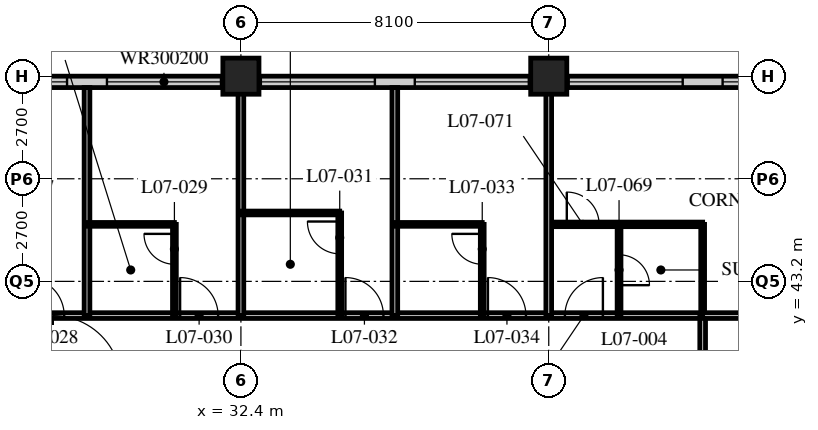
"""IFC4 building model, lengths in metres.
Left out: names, types, materials, properties, quantities, classifications, styles, units other than length and angle.
Written with IfcOpenShell. Run it as: python <this file> out.ifc"""

import sys

from ifc_helpers import new_model, si_unit, direction, frame, frame_2d, origin, origin_2d, place, context, subcontext, project, spatial, rectangle, hollow_rectangle, extrude, element, fill, save


model = new_model("IFC4")
c1 = context("Model", 3, precision=1e-05, world=origin(), true_north=direction((0.0, 1.0)))
c2 = subcontext(c1, "Body", "Model", "MODEL_VIEW")
j1 = project(units=[si_unit("LENGTHUNIT", "METRE"), si_unit("PLANEANGLEUNIT", "RADIAN")], contexts=[c1])
p1 = place(None, origin())
s1 = spatial("IfcSite", under=j1, at=p1, CompositionType="ELEMENT")
p2 = place(p1, origin())
s2 = spatial("IfcBuilding", under=s1, at=p2, CompositionType="ELEMENT")
p3 = place(p2, frame((0.0, 0.0, 36.4)))
s3 = spatial("IfcBuildingStorey", under=s2, at=p3, CompositionType="ELEMENT", Elevation=36.4)
for number, where, z_axis, x_axis in (
    (1, (32.4, 48.6, 0.0), (0.0, 0.0, 1.0), (1.0, 0.0, 0.0)),
    (2, (40.5, 48.6, 0.0), (0.0, 0.0, 1.0), (1.0, 0.0, 0.0)),
):
    element("IfcColumn", number, at=place(p3, frame(where, z_axis=z_axis, x_axis=x_axis)), inside=s3, PredefinedType="COLUMN", context=c2, shape_type="SweptSolid", body=[
        extrude(hollow_rectangle(XDim=0.95, YDim=0.95, WallThickness=0.095, at=origin_2d()), origin(), (0.0, 0.0, 1.0), 3.4),
    ])
p4 = place(p3, frame((48.3, 48.45, 0.0), z_axis=(0.0, 0.0, 1.0), x_axis=(-1.0, 0.0, 0.0)))
e3 = element("IfcWall", 3, at=p4, inside=s3, PredefinedType="SOLIDWALL", context=c2, shape_type="SweptSolid", body=[
    extrude(rectangle(XDim=40.2, YDim=0.3, at=frame_2d((20.1, 0.0))), origin(), (0.0, 0.0, 1.0), 3.19),
])
p5 = place(p4, frame((0.225, 0.0, 0.9)))
e4 = element("IfcOpeningElement", 4, at=p5, cuts=e3, PredefinedType="OPENING", context=c2, shape_type="SweptSolid", body=[
    extrude(rectangle(XDim=3.0, YDim=2.0, at=frame_2d((1.5, 1.0))), frame((0.0, 0.16, 0.0), z_axis=(0.0, -1.0, 0.0), x_axis=(1.0, 0.0, 0.0)), (0.0, 0.0, 1.0), 0.32),
])
p6 = place(p4, frame((4.275, 0.0, 0.9)))
e5 = element("IfcOpeningElement", 5, at=p6, cuts=e3, PredefinedType="OPENING", context=c2, shape_type="SweptSolid", body=[
    extrude(rectangle(XDim=3.0, YDim=2.0, at=frame_2d((1.5, 1.0))), frame((0.0, 0.16, 0.0), z_axis=(0.0, -1.0, 0.0), x_axis=(1.0, 0.0, 0.0)), (0.0, 0.0, 1.0), 0.32),
])
p7 = place(p4, frame((8.325, 0.0, 0.9)))
e6 = element("IfcOpeningElement", 6, at=p7, cuts=e3, PredefinedType="OPENING", context=c2, shape_type="SweptSolid", body=[
    extrude(rectangle(XDim=3.0, YDim=2.0, at=frame_2d((1.5, 1.0))), frame((0.0, 0.16, 0.0), z_axis=(0.0, -1.0, 0.0), x_axis=(1.0, 0.0, 0.0)), (0.0, 0.0, 1.0), 0.32),
])
p8 = place(p4, frame((12.375, 0.0, 0.9)))
e7 = element("IfcOpeningElement", 7, at=p8, cuts=e3, PredefinedType="OPENING", context=c2, shape_type="SweptSolid", body=[
    extrude(rectangle(XDim=3.0, YDim=2.0, at=frame_2d((1.5, 1.0))), frame((0.0, 0.16, 0.0), z_axis=(0.0, -1.0, 0.0), x_axis=(1.0, 0.0, 0.0)), (0.0, 0.0, 1.0), 0.32),
])
p9 = place(p4, frame((16.425, 0.0, 0.9)))
e8 = element("IfcOpeningElement", 8, at=p9, cuts=e3, PredefinedType="OPENING", context=c2, shape_type="SweptSolid", body=[
    extrude(rectangle(XDim=3.0, YDim=2.0, at=frame_2d((1.5, 1.0))), frame((0.0, 0.16, 0.0), z_axis=(0.0, -1.0, 0.0), x_axis=(1.0, 0.0, 0.0)), (0.0, 0.0, 1.0), 0.32),
])
p10 = place(p4, frame((20.475, 0.0, 0.9)))
e9 = element("IfcOpeningElement", 9, at=p10, cuts=e3, PredefinedType="OPENING", context=c2, shape_type="SweptSolid", body=[
    extrude(rectangle(XDim=3.0, YDim=2.0, at=frame_2d((1.5, 1.0))), frame((0.0, 0.16, 0.0), z_axis=(0.0, -1.0, 0.0), x_axis=(1.0, 0.0, 0.0)), (0.0, 0.0, 1.0), 0.32),
])
p11 = place(p4, frame((24.525, 0.0, 0.9)))
e10 = element("IfcOpeningElement", 10, at=p11, cuts=e3, PredefinedType="OPENING", context=c2, shape_type="SweptSolid", body=[
    extrude(rectangle(XDim=3.0, YDim=2.0, at=frame_2d((1.5, 1.0))), frame((0.0, 0.16, 0.0), z_axis=(0.0, -1.0, 0.0), x_axis=(1.0, 0.0, 0.0)), (0.0, 0.0, 1.0), 0.32),
])
p12 = place(p4, frame((28.575, 0.0, 0.9)))
e11 = element("IfcOpeningElement", 11, at=p12, cuts=e3, PredefinedType="OPENING", context=c2, shape_type="SweptSolid", body=[
    extrude(rectangle(XDim=3.0, YDim=2.0, at=frame_2d((1.5, 1.0))), frame((0.0, 0.16, 0.0), z_axis=(0.0, -1.0, 0.0), x_axis=(1.0, 0.0, 0.0)), (0.0, 0.0, 1.0), 0.32),
])
p13 = place(p4, frame((32.625, 0.0, 0.9)))
e12 = element("IfcOpeningElement", 12, at=p13, cuts=e3, PredefinedType="OPENING", context=c2, shape_type="SweptSolid", body=[
    extrude(rectangle(XDim=3.0, YDim=2.0, at=frame_2d((1.5, 1.0))), frame((0.0, 0.16, 0.0), z_axis=(0.0, -1.0, 0.0), x_axis=(1.0, 0.0, 0.0)), (0.0, 0.0, 1.0), 0.32),
])
p14 = place(p4, frame((36.675, 0.0, 0.9)))
e13 = element("IfcOpeningElement", 13, at=p14, cuts=e3, PredefinedType="OPENING", context=c2, shape_type="SweptSolid", body=[
    extrude(rectangle(XDim=3.0, YDim=2.0, at=frame_2d((1.5, 1.0))), frame((0.0, 0.16, 0.0), z_axis=(0.0, -1.0, 0.0), x_axis=(1.0, 0.0, 0.0)), (0.0, 0.0, 1.0), 0.32),
])
p15 = place(p3, frame((12.15, 42.3, 0.0), z_axis=(0.0, 0.0, 1.0), x_axis=(1.0, 0.0, 0.0)))
e14 = element("IfcWall", 14, at=p15, inside=s3, PredefinedType="PARTITIONING", context=c2, shape_type="SweptSolid", body=[
    extrude(rectangle(XDim=32.4, YDim=0.15, at=frame_2d((16.2, 0.0))), origin(), (0.0, 0.0, 1.0), 3.19),
])
p16 = place(p15, frame((6.5, 0.0, 0.0)))
e15 = element("IfcOpeningElement", 15, at=p16, cuts=e14, PredefinedType="OPENING", context=c2, shape_type="SweptSolid", body=[
    extrude(rectangle(XDim=1.0, YDim=2.1, at=frame_2d((0.5, 1.05))), frame((0.0, 0.085, 0.0), z_axis=(0.0, -1.0, 0.0), x_axis=(1.0, 0.0, 0.0)), (0.0, 0.0, 1.0), 0.17),
])
p17 = place(p15, frame((8.4, 0.0, 0.0)))
e16 = element("IfcOpeningElement", 16, at=p17, cuts=e14, PredefinedType="OPENING", context=c2, shape_type="SweptSolid", body=[
    extrude(rectangle(XDim=1.0, YDim=2.1, at=frame_2d((0.5, 1.05))), frame((0.0, 0.085, 0.0), z_axis=(0.0, -1.0, 0.0), x_axis=(1.0, 0.0, 0.0)), (0.0, 0.0, 1.0), 0.17),
])
p18 = place(p15, frame((14.6, 0.0, 0.0)))
e17 = element("IfcOpeningElement", 17, at=p18, cuts=e14, PredefinedType="OPENING", context=c2, shape_type="SweptSolid", body=[
    extrude(rectangle(XDim=1.0, YDim=2.1, at=frame_2d((0.5, 1.05))), frame((0.0, 0.085, 0.0), z_axis=(0.0, -1.0, 0.0), x_axis=(1.0, 0.0, 0.0)), (0.0, 0.0, 1.0), 0.17),
])
p19 = place(p15, frame((18.65, 0.0, 0.0)))
e18 = element("IfcOpeningElement", 18, at=p19, cuts=e14, PredefinedType="OPENING", context=c2, shape_type="SweptSolid", body=[
    extrude(rectangle(XDim=1.0, YDim=2.1, at=frame_2d((0.5, 1.05))), frame((0.0, 0.085, 0.0), z_axis=(0.0, -1.0, 0.0), x_axis=(1.0, 0.0, 0.0)), (0.0, 0.0, 1.0), 0.17),
])
p20 = place(p15, frame((23.0, 0.0, 0.0)))
e19 = element("IfcOpeningElement", 19, at=p20, cuts=e14, PredefinedType="OPENING", context=c2, shape_type="SweptSolid", body=[
    extrude(rectangle(XDim=1.0, YDim=2.1, at=frame_2d((0.5, 1.05))), frame((0.0, 0.085, 0.0), z_axis=(0.0, -1.0, 0.0), x_axis=(1.0, 0.0, 0.0)), (0.0, 0.0, 1.0), 0.17),
])
p21 = place(p15, frame((26.75, 0.0, 0.0)))
e20 = element("IfcOpeningElement", 20, at=p21, cuts=e14, PredefinedType="OPENING", context=c2, shape_type="SweptSolid", body=[
    extrude(rectangle(XDim=1.0, YDim=2.1, at=frame_2d((0.5, 1.05))), frame((0.0, 0.085, 0.0), z_axis=(0.0, -1.0, 0.0), x_axis=(1.0, 0.0, 0.0)), (0.0, 0.0, 1.0), 0.17),
])
p22 = place(p15, frame((28.775, 0.0, 0.0)))
e21 = element("IfcOpeningElement", 21, at=p22, cuts=e14, PredefinedType="OPENING", context=c2, shape_type="SweptSolid", body=[
    extrude(rectangle(XDim=1.0, YDim=2.1, at=frame_2d((0.5, 1.05))), frame((0.0, 0.085, 0.0), z_axis=(0.0, -1.0, 0.0), x_axis=(1.0, 0.0, 0.0)), (0.0, 0.0, 1.0), 0.17),
])
p23 = place(p15, frame((2.625, 0.0, 0.0)))
e22 = element("IfcOpeningElement", 22, at=p23, cuts=e14, PredefinedType="OPENING", context=c2, shape_type="SweptSolid", body=[
    extrude(rectangle(XDim=1.0, YDim=2.1, at=frame_2d((0.5, 1.05))), frame((0.0, 0.085, 0.0), z_axis=(0.0, -1.0, 0.0), x_axis=(1.0, 0.0, 0.0)), (0.0, 0.0, 1.0), 0.17),
])
p24 = place(p3, frame((44.55, 16.2, 0.0), z_axis=(0.0, 0.0, 1.0), x_axis=(0.0, 1.0, 0.0)))
e23 = element("IfcWall", 23, at=p24, inside=s3, PredefinedType="PARTITIONING", context=c2, shape_type="SweptSolid", body=[
    extrude(rectangle(XDim=26.1, YDim=0.15, at=frame_2d((13.05, 0.0))), origin(), (0.0, 0.0, 1.0), 3.19),
])
p25 = place(p24, frame((2.75, 0.0, 0.0)))
e24 = element("IfcOpeningElement", 24, at=p25, cuts=e23, PredefinedType="OPENING", context=c2, shape_type="SweptSolid", body=[
    extrude(rectangle(XDim=1.0, YDim=2.1, at=frame_2d((0.5, 1.05))), frame((0.0, 0.085, 0.0), z_axis=(0.0, -1.0, 0.0), x_axis=(1.0, 0.0, 0.0)), (0.0, 0.0, 1.0), 0.17),
])
p26 = place(p24, frame((4.35, 0.0, 0.0)))
e25 = element("IfcOpeningElement", 25, at=p26, cuts=e23, PredefinedType="OPENING", context=c2, shape_type="SweptSolid", body=[
    extrude(rectangle(XDim=1.0, YDim=2.1, at=frame_2d((0.5, 1.05))), frame((0.0, 0.085, 0.0), z_axis=(0.0, -1.0, 0.0), x_axis=(1.0, 0.0, 0.0)), (0.0, 0.0, 1.0), 0.17),
])
p27 = place(p24, frame((8.4, 0.0, 0.0)))
e26 = element("IfcOpeningElement", 26, at=p27, cuts=e23, PredefinedType="OPENING", context=c2, shape_type="SweptSolid", body=[
    extrude(rectangle(XDim=1.0, YDim=2.1, at=frame_2d((0.5, 1.05))), frame((0.0, 0.085, 0.0), z_axis=(0.0, -1.0, 0.0), x_axis=(1.0, 0.0, 0.0)), (0.0, 0.0, 1.0), 0.17),
])
p28 = place(p24, frame((14.6, 0.0, 0.0)))
e27 = element("IfcOpeningElement", 27, at=p28, cuts=e23, PredefinedType="OPENING", context=c2, shape_type="SweptSolid", body=[
    extrude(rectangle(XDim=1.0, YDim=2.1, at=frame_2d((0.5, 1.05))), frame((0.0, 0.085, 0.0), z_axis=(0.0, -1.0, 0.0), x_axis=(1.0, 0.0, 0.0)), (0.0, 0.0, 1.0), 0.17),
])
p29 = place(p24, frame((18.65, 0.0, 0.0)))
e28 = element("IfcOpeningElement", 28, at=p29, cuts=e23, PredefinedType="OPENING", context=c2, shape_type="SweptSolid", body=[
    extrude(rectangle(XDim=1.0, YDim=2.1, at=frame_2d((0.5, 1.05))), frame((0.0, 0.085, 0.0), z_axis=(0.0, -1.0, 0.0), x_axis=(1.0, 0.0, 0.0)), (0.0, 0.0, 1.0), 0.17),
])
p30 = place(p24, frame((22.65, 0.0, 0.0)))
e29 = element("IfcOpeningElement", 29, at=p30, cuts=e23, PredefinedType="OPENING", context=c2, shape_type="SweptSolid", body=[
    extrude(rectangle(XDim=1.0, YDim=2.1, at=frame_2d((0.5, 1.05))), frame((0.0, 0.085, 0.0), z_axis=(0.0, -1.0, 0.0), x_axis=(1.0, 0.0, 0.0)), (0.0, 0.0, 1.0), 0.17),
])
p31 = place(p3, frame((28.35, 42.3, 0.0), z_axis=(0.0, 0.0, 1.0), x_axis=(0.0, 1.0, 0.0)))
e30 = element("IfcWall", 30, at=p31, inside=s3, PredefinedType="PARTITIONING", context=c2, shape_type="SweptSolid", body=[
    extrude(rectangle(XDim=6.0, YDim=0.15, at=frame_2d((3.0, 0.0))), origin(), (0.0, 0.0, 1.0), 3.19),
])
p32 = place(p3, frame((28.35, 44.7, 0.0), z_axis=(0.0, 0.0, 1.0), x_axis=(1.0, 0.0, 0.0)))
e31 = element("IfcWall", 31, at=p32, inside=s3, PredefinedType="PARTITIONING", context=c2, shape_type="SweptSolid", body=[
    extrude(rectangle(XDim=2.3, YDim=0.1, at=frame_2d((1.15, 0.0))), origin(), (0.0, 0.0, 1.0), 3.19),
])
p33 = place(p3, frame((30.65, 42.3, 0.0), z_axis=(0.0, 0.0, 1.0), x_axis=(0.0, 1.0, 0.0)))
e32 = element("IfcWall", 32, at=p33, inside=s3, PredefinedType="PARTITIONING", context=c2, shape_type="SweptSolid", body=[
    extrude(rectangle(XDim=2.4, YDim=0.1, at=frame_2d((1.2, 0.0))), origin(), (0.0, 0.0, 1.0), 3.19),
])
p34 = place(p33, frame((1.35, 0.0, 0.0)))
e33 = element("IfcOpeningElement", 33, at=p34, cuts=e32, PredefinedType="OPENING", context=c2, shape_type="SweptSolid", body=[
    extrude(rectangle(XDim=0.8, YDim=2.1, at=frame_2d((0.4, 1.05))), frame((0.0, 0.06, 0.0), z_axis=(0.0, -1.0, 0.0), x_axis=(1.0, 0.0, 0.0)), (0.0, 0.0, 1.0), 0.12),
])
p35 = place(p3, frame((32.4, 42.3, 0.0), z_axis=(0.0, 0.0, 1.0), x_axis=(0.0, 1.0, 0.0)))
e34 = element("IfcWall", 34, at=p35, inside=s3, PredefinedType="PARTITIONING", context=c2, shape_type="SweptSolid", body=[
    extrude(rectangle(XDim=6.0, YDim=0.15, at=frame_2d((3.0, 0.0))), origin(), (0.0, 0.0, 1.0), 2.578),
])
p36 = place(p3, frame((32.4, 45.0, 0.0), z_axis=(0.0, 0.0, 1.0), x_axis=(1.0, 0.0, 0.0)))
e35 = element("IfcWall", 35, at=p36, inside=s3, PredefinedType="PARTITIONING", context=c2, shape_type="SweptSolid", body=[
    extrude(rectangle(XDim=2.6, YDim=0.1, at=frame_2d((1.3, 0.0))), origin(), (0.0, 0.0, 1.0), 3.19),
])
p37 = place(p3, frame((35.0, 42.3, 0.0), z_axis=(0.0, 0.0, 1.0), x_axis=(0.0, 1.0, 0.0)))
e36 = element("IfcWall", 36, at=p37, inside=s3, PredefinedType="PARTITIONING", context=c2, shape_type="SweptSolid", body=[
    extrude(rectangle(XDim=2.7, YDim=0.1, at=frame_2d((1.35, 0.0))), origin(), (0.0, 0.0, 1.0), 3.19),
])
p38 = place(p37, frame((1.625, 0.0, 0.0)))
e37 = element("IfcOpeningElement", 37, at=p38, cuts=e36, PredefinedType="OPENING", context=c2, shape_type="SweptSolid", body=[
    extrude(rectangle(XDim=0.85, YDim=2.1, at=frame_2d((0.425, 1.05))), frame((0.0, 0.06, 0.0), z_axis=(0.0, -1.0, 0.0), x_axis=(1.0, 0.0, 0.0)), (0.0, 0.0, 1.0), 0.12),
])
p39 = place(p3, frame((36.45, 42.3, 0.0), z_axis=(0.0, 0.0, 1.0), x_axis=(0.0, 1.0, 0.0)))
e38 = element("IfcWall", 38, at=p39, inside=s3, PredefinedType="PARTITIONING", context=c2, shape_type="SweptSolid", body=[
    extrude(rectangle(XDim=6.0, YDim=0.15, at=frame_2d((3.0, 0.0))), origin(), (0.0, 0.0, 1.0), 3.19),
])
p40 = place(p3, frame((36.45, 44.7, 0.0), z_axis=(0.0, 0.0, 1.0), x_axis=(1.0, 0.0, 0.0)))
e39 = element("IfcWall", 39, at=p40, inside=s3, PredefinedType="PARTITIONING", context=c2, shape_type="SweptSolid", body=[
    extrude(rectangle(XDim=2.3, YDim=0.1, at=frame_2d((1.15, 0.0))), origin(), (0.0, 0.0, 1.0), 3.19),
])
p41 = place(p3, frame((38.75, 42.3, 0.0), z_axis=(0.0, 0.0, 1.0), x_axis=(0.0, 1.0, 0.0)))
e40 = element("IfcWall", 40, at=p41, inside=s3, PredefinedType="PARTITIONING", context=c2, shape_type="SweptSolid", body=[
    extrude(rectangle(XDim=2.4, YDim=0.1, at=frame_2d((1.2, 0.0))), origin(), (0.0, 0.0, 1.0), 3.19),
])
p42 = place(p41, frame((1.35, 0.0, 0.0)))
e41 = element("IfcOpeningElement", 41, at=p42, cuts=e40, PredefinedType="OPENING", context=c2, shape_type="SweptSolid", body=[
    extrude(rectangle(XDim=0.8, YDim=2.1, at=frame_2d((0.4, 1.05))), frame((0.0, 0.06, 0.0), z_axis=(0.0, -1.0, 0.0), x_axis=(1.0, 0.0, 0.0)), (0.0, 0.0, 1.0), 0.12),
])
p43 = place(p3, frame((40.5, 44.7, 0.0), z_axis=(0.0, 0.0, 1.0), x_axis=(1.0, 0.0, 0.0)))
e42 = element("IfcWall", 42, at=p43, inside=s3, PredefinedType="PARTITIONING", context=c2, shape_type="SweptSolid", body=[
    extrude(rectangle(XDim=4.05, YDim=0.12, at=frame_2d((2.025, 0.0))), origin(), (0.0, 0.0, 1.0), 3.19),
])
p44 = place(p43, frame((0.475, 0.0, 0.0)))
e43 = element("IfcOpeningElement", 43, at=p44, cuts=e42, PredefinedType="OPENING", context=c2, shape_type="SweptSolid", body=[
    extrude(rectangle(XDim=0.85, YDim=2.1, at=frame_2d((0.425, 1.05))), frame((0.0, 0.07, 0.0), z_axis=(0.0, -1.0, 0.0), x_axis=(1.0, 0.0, 0.0)), (0.0, 0.0, 1.0), 0.14),
])
p45 = place(p3, frame((42.35, 42.3, 0.0), z_axis=(0.0, 0.0, 1.0), x_axis=(0.0, 1.0, 0.0)))
e44 = element("IfcWall", 44, at=p45, inside=s3, PredefinedType="PARTITIONING", context=c2, shape_type="SweptSolid", body=[
    extrude(rectangle(XDim=2.4, YDim=0.1, at=frame_2d((1.2, 0.0))), origin(), (0.0, 0.0, 1.0), 3.19),
])
p46 = place(p45, frame((0.8, 0.0, 0.0)))
e45 = element("IfcOpeningElement", 45, at=p46, cuts=e44, PredefinedType="OPENING", context=c2, shape_type="SweptSolid", body=[
    extrude(rectangle(XDim=0.8, YDim=2.1, at=frame_2d((0.4, 1.05))), frame((0.0, 0.06, 0.0), z_axis=(0.0, -1.0, 0.0), x_axis=(1.0, 0.0, 0.0)), (0.0, 0.0, 1.0), 0.12),
])
p47 = place(p3, frame((44.55, 42.3, 0.0), z_axis=(0.0, 0.0, 1.0), x_axis=(0.0, 1.0, 0.0)))
e46 = element("IfcWall", 46, at=p47, inside=s3, PredefinedType="PARTITIONING", context=c2, shape_type="SweptSolid", body=[
    extrude(rectangle(XDim=2.4, YDim=0.1, at=frame_2d((1.2, 0.0))), origin(), (0.0, 0.0, 1.0), 3.19),
])
p48 = place(p3, frame((44.55, 42.3, 0.0), z_axis=(0.0, 0.0, 1.0), x_axis=(1.0, 0.0, 0.0)))
e47 = element("IfcWall", 47, at=p48, inside=s3, PredefinedType="PARTITIONING", context=c2, shape_type="SweptSolid", body=[
    extrude(rectangle(XDim=7.8, YDim=0.15, at=frame_2d((3.9, 0.0))), origin(), (0.0, 0.0, 1.0), 3.19),
])
p49 = place(p3, frame((40.5, 42.3, 0.0), z_axis=(0.0, 0.0, 1.0), x_axis=(0.0, 1.0, 0.0)))
e48 = element("IfcWall", 48, at=p49, inside=s3, PredefinedType="PARTITIONING", context=c2, shape_type="SweptSolid", body=[
    extrude(rectangle(XDim=6.0, YDim=0.15, at=frame_2d((3.0, 0.0))), origin(), (0.0, 0.0, 1.0), 2.578),
])
p50 = place(p5, origin())
e49 = element("IfcWindow", 49, at=p50, inside=s3, PartitioningType="SINGLE_PANEL", PredefinedType="WINDOW", context=c2, shape_type="SweptSolid", body=[
    extrude(rectangle(XDim=3.0, YDim=2.0, at=frame_2d((1.5, 1.0))), frame((0.0, 0.03, 0.0), z_axis=(0.0, -1.0, 0.0), x_axis=(1.0, 0.0, 0.0)), (0.0, 0.0, 1.0), 0.06),
])
fill(e4, e49)
p51 = place(p6, origin())
e50 = element("IfcWindow", 50, at=p51, inside=s3, PartitioningType="SINGLE_PANEL", PredefinedType="WINDOW", context=c2, shape_type="SweptSolid", body=[
    extrude(rectangle(XDim=3.0, YDim=2.0, at=frame_2d((1.5, 1.0))), frame((0.0, 0.03, 0.0), z_axis=(0.0, -1.0, 0.0), x_axis=(1.0, 0.0, 0.0)), (0.0, 0.0, 1.0), 0.06),
])
fill(e5, e50)
p52 = place(p7, origin())
e51 = element("IfcWindow", 51, at=p52, inside=s3, PartitioningType="SINGLE_PANEL", PredefinedType="WINDOW", context=c2, shape_type="SweptSolid", body=[
    extrude(rectangle(XDim=3.0, YDim=2.0, at=frame_2d((1.5, 1.0))), frame((0.0, 0.03, 0.0), z_axis=(0.0, -1.0, 0.0), x_axis=(1.0, 0.0, 0.0)), (0.0, 0.0, 1.0), 0.06),
])
fill(e6, e51)
p53 = place(p8, origin())
e52 = element("IfcWindow", 52, at=p53, inside=s3, PartitioningType="SINGLE_PANEL", PredefinedType="WINDOW", context=c2, shape_type="SweptSolid", body=[
    extrude(rectangle(XDim=3.0, YDim=2.0, at=frame_2d((1.5, 1.0))), frame((0.0, 0.03, 0.0), z_axis=(0.0, -1.0, 0.0), x_axis=(1.0, 0.0, 0.0)), (0.0, 0.0, 1.0), 0.06),
])
fill(e7, e52)
p54 = place(p9, origin())
e53 = element("IfcWindow", 53, at=p54, inside=s3, PartitioningType="SINGLE_PANEL", PredefinedType="WINDOW", context=c2, shape_type="SweptSolid", body=[
    extrude(rectangle(XDim=3.0, YDim=2.0, at=frame_2d((1.5, 1.0))), frame((0.0, 0.03, 0.0), z_axis=(0.0, -1.0, 0.0), x_axis=(1.0, 0.0, 0.0)), (0.0, 0.0, 1.0), 0.06),
])
fill(e8, e53)
p55 = place(p10, origin())
e54 = element("IfcWindow", 54, at=p55, inside=s3, PartitioningType="SINGLE_PANEL", PredefinedType="WINDOW", context=c2, shape_type="SweptSolid", body=[
    extrude(rectangle(XDim=3.0, YDim=2.0, at=frame_2d((1.5, 1.0))), frame((0.0, 0.03, 0.0), z_axis=(0.0, -1.0, 0.0), x_axis=(1.0, 0.0, 0.0)), (0.0, 0.0, 1.0), 0.06),
])
fill(e9, e54)
p56 = place(p18, origin())
e55 = element("IfcDoor", 55, at=p56, inside=s3, OperationType="SINGLE_SWING_LEFT", PredefinedType="DOOR", context=c2, shape_type="SweptSolid", body=[
    extrude(rectangle(XDim=1.0, YDim=2.1, at=frame_2d((0.5, 1.05))), frame((0.0, 0.025, 0.0), z_axis=(0.0, -1.0, 0.0), x_axis=(1.0, 0.0, 0.0)), (0.0, 0.0, 1.0), 0.05),
])
fill(e17, e55)
p57 = place(p34, origin())
e56 = element("IfcDoor", 56, at=p57, inside=s3, OperationType="SINGLE_SWING_RIGHT", PredefinedType="DOOR", context=c2, shape_type="SweptSolid", body=[
    extrude(rectangle(XDim=0.8, YDim=2.1, at=frame_2d((0.4, 1.05))), frame((0.0, 0.025, 0.0), z_axis=(0.0, -1.0, 0.0), x_axis=(1.0, 0.0, 0.0)), (0.0, 0.0, 1.0), 0.05),
])
fill(e33, e56)
p58 = place(p19, origin())
e57 = element("IfcDoor", 57, at=p58, inside=s3, OperationType="SINGLE_SWING_LEFT", PredefinedType="DOOR", context=c2, shape_type="SweptSolid", body=[
    extrude(rectangle(XDim=1.0, YDim=2.1, at=frame_2d((0.5, 1.05))), frame((0.0, 0.025, 0.0), z_axis=(0.0, -1.0, 0.0), x_axis=(1.0, 0.0, 0.0)), (0.0, 0.0, 1.0), 0.05),
])
fill(e18, e57)
p59 = place(p38, origin())
e58 = element("IfcDoor", 58, at=p59, inside=s3, OperationType="SINGLE_SWING_RIGHT", PredefinedType="DOOR", context=c2, shape_type="SweptSolid", body=[
    extrude(rectangle(XDim=0.85, YDim=2.1, at=frame_2d((0.425, 1.05))), frame((0.0, 0.025, 0.0), z_axis=(0.0, -1.0, 0.0), x_axis=(1.0, 0.0, 0.0)), (0.0, 0.0, 1.0), 0.05),
])
fill(e37, e58)
p60 = place(p20, origin())
e59 = element("IfcDoor", 59, at=p60, inside=s3, OperationType="SINGLE_SWING_LEFT", PredefinedType="DOOR", context=c2, shape_type="SweptSolid", body=[
    extrude(rectangle(XDim=1.0, YDim=2.1, at=frame_2d((0.5, 1.05))), frame((0.0, 0.025, 0.0), z_axis=(0.0, -1.0, 0.0), x_axis=(1.0, 0.0, 0.0)), (0.0, 0.0, 1.0), 0.05),
])
fill(e19, e59)
p61 = place(p42, origin())
e60 = element("IfcDoor", 60, at=p61, inside=s3, OperationType="SINGLE_SWING_RIGHT", PredefinedType="DOOR", context=c2, shape_type="SweptSolid", body=[
    extrude(rectangle(XDim=0.8, YDim=2.1, at=frame_2d((0.4, 1.05))), frame((0.0, 0.025, 0.0), z_axis=(0.0, -1.0, 0.0), x_axis=(1.0, 0.0, 0.0)), (0.0, 0.0, 1.0), 0.05),
])
fill(e41, e60)
p62 = place(p21, origin())
e61 = element("IfcDoor", 61, at=p62, inside=s3, OperationType="SINGLE_SWING_LEFT", PredefinedType="DOOR", context=c2, shape_type="SweptSolid", body=[
    extrude(rectangle(XDim=1.0, YDim=2.1, at=frame_2d((0.5, 1.05))), frame((0.0, 0.025, 0.0), z_axis=(0.0, -1.0, 0.0), x_axis=(1.0, 0.0, 0.0)), (0.0, 0.0, 1.0), 0.05),
])
fill(e20, e61)
p63 = place(p46, origin())
e62 = element("IfcDoor", 62, at=p63, inside=s3, OperationType="SINGLE_SWING_RIGHT", PredefinedType="DOOR", context=c2, shape_type="SweptSolid", body=[
    extrude(rectangle(XDim=0.8, YDim=2.1, at=frame_2d((0.4, 1.05))), frame((0.0, 0.025, 0.0), z_axis=(0.0, -1.0, 0.0), x_axis=(1.0, 0.0, 0.0)), (0.0, 0.0, 1.0), 0.05),
])
fill(e45, e62)
p64 = place(p22, origin())
e63 = element("IfcDoor", 63, at=p64, inside=s3, OperationType="SINGLE_SWING_RIGHT", PredefinedType="DOOR", context=c2, shape_type="SweptSolid", body=[
    extrude(rectangle(XDim=1.0, YDim=2.1, at=frame_2d((0.5, 1.05))), frame((0.0, 0.025, 0.0), z_axis=(0.0, -1.0, 0.0), x_axis=(1.0, 0.0, 0.0)), (0.0, 0.0, 1.0), 0.05),
])
fill(e21, e63)
p65 = place(p44, origin())
e64 = element("IfcDoor", 64, at=p65, inside=s3, OperationType="SINGLE_SWING_LEFT", PredefinedType="DOOR", context=c2, shape_type="SweptSolid", body=[
    extrude(rectangle(XDim=0.85, YDim=2.1, at=frame_2d((0.425, 1.05))), frame((0.0, 0.025, 0.0), z_axis=(0.0, -1.0, 0.0), x_axis=(1.0, 0.0, 0.0)), (0.0, 0.0, 1.0), 0.05),
])
fill(e43, e64)
save(model, sys.argv[1])
